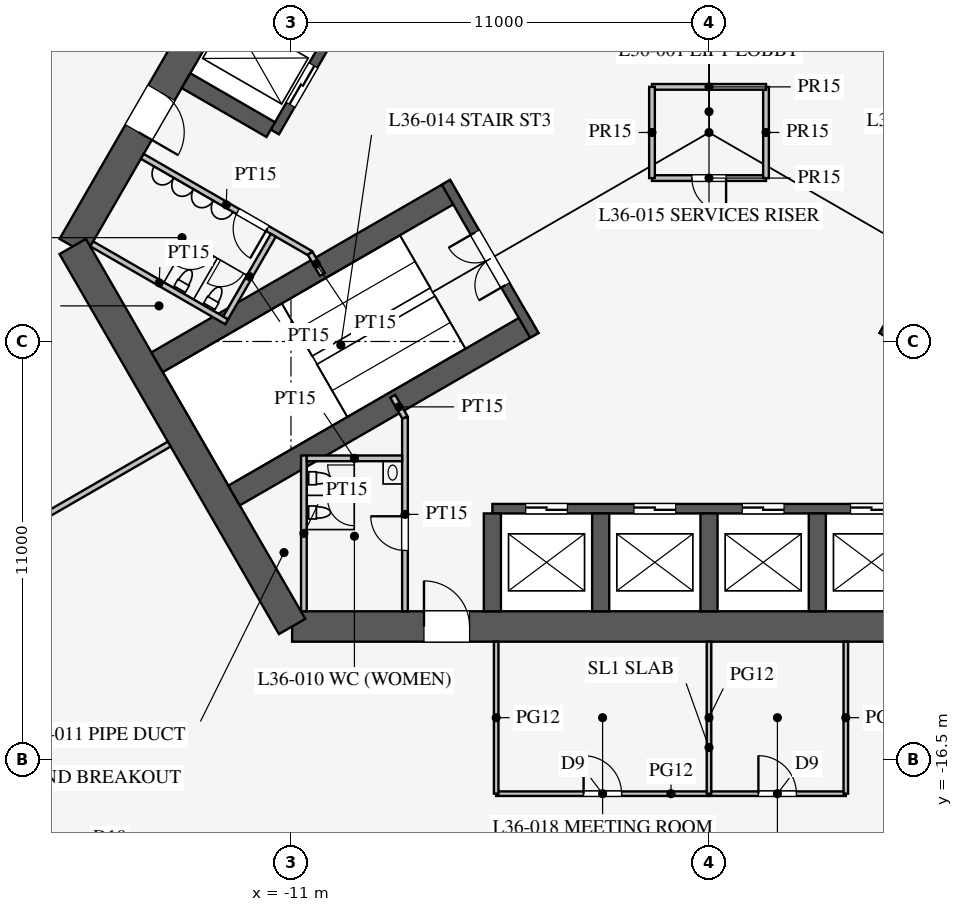
"""IFC4 building model, lengths in metres.
Left out: names, types, materials, properties, quantities, classifications, styles, units other than length and angle.
Written with IfcOpenShell. Run it as: python <this file> out.ifc"""

import sys

from ifc_helpers import new_model, si_unit, direction, frame, frame_2d, origin, place, context, subcontext, project, spatial, rectangle, extrude, element, fill, save


model = new_model("IFC4")
c1 = context("Model", 3, precision=1e-05, world=origin(), true_north=direction((0.0, 1.0)))
c2 = subcontext(c1, "Body", "Model", "MODEL_VIEW")
j1 = project(units=[si_unit("LENGTHUNIT", "METRE"), si_unit("PLANEANGLEUNIT", "RADIAN")], contexts=[c1])
p1 = place(None, origin())
s1 = spatial("IfcSite", under=j1, at=p1, CompositionType="ELEMENT")
p2 = place(p1, origin())
s2 = spatial("IfcBuilding", under=s1, at=p2, CompositionType="ELEMENT")
p3 = place(p2, frame((0.0, 0.0, 157.7)))
s3 = spatial("IfcBuildingStorey", under=s2, at=p3, CompositionType="ELEMENT", Elevation=157.7)
p4 = place(p3, frame((-10.97, -13.0, 0.0), z_axis=(0.0, 0.0, 1.0), x_axis=(1.0, 0.0, 0.0)))
e1 = element("IfcWall", 1, at=p4, inside=s3, PredefinedType="SHEAR", context=c2, shape_type="SweptSolid", body=[
    extrude(rectangle(XDim=21.939, YDim=0.8, at=frame_2d((10.97, 0.0))), origin(), (0.0, 0.0, 1.0), 4.2),
])
p5 = place(p4, frame((17.27, 0.0, 0.0)))
e2 = element("IfcOpeningElement", 2, at=p5, cuts=e1, PredefinedType="OPENING", context=c2, shape_type="SweptSolid", body=[
    extrude(rectangle(XDim=1.2, YDim=2.1, at=frame_2d((0.6, 1.05))), frame((0.0, 0.41, 0.0), z_axis=(0.0, -1.0, 0.0), x_axis=(1.0, 0.0, 0.0)), (0.0, 0.0, 1.0), 0.82),
])
p6 = place(p4, frame((3.47, 0.0, 0.0)))
e3 = element("IfcOpeningElement", 3, at=p6, cuts=e1, PredefinedType="OPENING", context=c2, shape_type="SweptSolid", body=[
    extrude(rectangle(XDim=1.2, YDim=2.1, at=frame_2d((0.6, 1.05))), frame((0.0, 0.41, 0.0), z_axis=(0.0, -1.0, 0.0), x_axis=(1.0, 0.0, 0.0)), (0.0, 0.0, 1.0), 0.82),
])
p7 = place(p3, frame((-5.773, 16.0, 0.0), z_axis=(0.0, 0.0, 1.0), x_axis=(-0.500002442456, -0.866023993627, 0.0)))
e4 = element("IfcWall", 4, at=p7, inside=s3, PredefinedType="SHEAR", context=c2, shape_type="SweptSolid", body=[
    extrude(rectangle(XDim=21.939, YDim=0.8, at=frame_2d((10.97, 0.0))), origin(), (0.0, 0.0, 1.0), 4.2),
])
p8 = place(p7, frame((17.27, 0.0, 0.0)))
e5 = element("IfcOpeningElement", 5, at=p8, cuts=e4, PredefinedType="OPENING", context=c2, shape_type="SweptSolid", body=[
    extrude(rectangle(XDim=1.2, YDim=2.1, at=frame_2d((0.6, 1.05))), frame((0.0, 0.41, 0.0), z_axis=(0.0, -1.0, 0.0), x_axis=(1.0, 0.0, 0.0)), (0.0, 0.0, 1.0), 0.82),
])
p9 = place(p7, frame((3.47, 0.0, 0.0)))
e6 = element("IfcOpeningElement", 6, at=p9, cuts=e4, PredefinedType="OPENING", context=c2, shape_type="SweptSolid", body=[
    extrude(rectangle(XDim=1.2, YDim=2.1, at=frame_2d((0.6, 1.05))), frame((0.0, 0.41, 0.0), z_axis=(0.0, -1.0, 0.0), x_axis=(1.0, 0.0, 0.0)), (0.0, 0.0, 1.0), 0.82),
])
p10 = place(p3, frame((-16.743, -3.0, 0.0), z_axis=(0.0, 0.0, 1.0), x_axis=(0.499995765644, -0.866027848477, 0.0)))
e7 = element("IfcWall", 7, at=p10, inside=s3, PredefinedType="SHEAR", context=c2, shape_type="SweptSolid", body=[
    extrude(rectangle(XDim=11.547, YDim=0.8, at=frame_2d((5.773, 0.0))), origin(), (0.0, 0.0, 1.0), 4.2),
])
p11 = place(p3, frame((-5.7, -9.9, 0.0), z_axis=(0.0, 0.0, 1.0), x_axis=(1.0, 0.0, 0.0)))
e8 = element("IfcWall", 8, at=p11, inside=s3, PredefinedType="SHEAR", context=c2, shape_type="SweptSolid", body=[
    extrude(rectangle(XDim=11.4, YDim=0.25, at=frame_2d((5.7, 0.0))), origin(), (0.0, 0.0, 1.0), 4.2),
])
p12 = place(p11, frame((0.875, 0.0, 0.0)))
e9 = element("IfcOpeningElement", 9, at=p12, cuts=e8, PredefinedType="OPENING", context=c2, shape_type="SweptSolid", body=[
    extrude(rectangle(XDim=1.1, YDim=2.2, at=frame_2d((0.55, 1.1))), frame((0.0, 0.135, 0.0), z_axis=(0.0, -1.0, 0.0), x_axis=(1.0, 0.0, 0.0)), (0.0, 0.0, 1.0), 0.27),
])
p13 = place(p11, frame((3.725, 0.0, 0.0)))
e10 = element("IfcOpeningElement", 10, at=p13, cuts=e8, PredefinedType="OPENING", context=c2, shape_type="SweptSolid", body=[
    extrude(rectangle(XDim=1.1, YDim=2.2, at=frame_2d((0.55, 1.1))), frame((0.0, 0.135, 0.0), z_axis=(0.0, -1.0, 0.0), x_axis=(1.0, 0.0, 0.0)), (0.0, 0.0, 1.0), 0.27),
])
p14 = place(p11, frame((6.575, 0.0, 0.0)))
e11 = element("IfcOpeningElement", 11, at=p14, cuts=e8, PredefinedType="OPENING", context=c2, shape_type="SweptSolid", body=[
    extrude(rectangle(XDim=1.1, YDim=2.2, at=frame_2d((0.55, 1.1))), frame((0.0, 0.135, 0.0), z_axis=(0.0, -1.0, 0.0), x_axis=(1.0, 0.0, 0.0)), (0.0, 0.0, 1.0), 0.27),
])
p15 = place(p11, frame((9.425, 0.0, 0.0)))
e12 = element("IfcOpeningElement", 12, at=p15, cuts=e8, PredefinedType="OPENING", context=c2, shape_type="SweptSolid", body=[
    extrude(rectangle(XDim=1.1, YDim=2.2, at=frame_2d((0.55, 1.1))), frame((0.0, 0.135, 0.0), z_axis=(0.0, -1.0, 0.0), x_axis=(1.0, 0.0, 0.0)), (0.0, 0.0, 1.0), 0.27),
])
for number, where, z_axis, x_axis in (
    (13, (-5.7, -10.025, 0.0), (0.0, 0.0, 1.0), (0.0, -1.0, 0.0)),
    (14, (-2.85, -10.025, 0.0), (0.0, 0.0, 1.0), (0.0, -1.0, 0.0)),
    (15, (0.0, -10.025, 0.0), (0.0, 0.0, 1.0), (0.0, -1.0, 0.0)),
    (16, (2.85, -10.025, 0.0), (0.0, 0.0, 1.0), (0.0, -1.0, 0.0)),
):
    element("IfcWall", number, at=place(p3, frame(where, z_axis=z_axis, x_axis=x_axis)), inside=s3, PredefinedType="SHEAR", context=c2, shape_type="SweptSolid", body=[
        extrude(rectangle(XDim=2.575, YDim=0.45, at=frame_2d((1.288, 0.0))), origin(), (0.0, 0.0, 1.0), 4.2),
    ])
p16 = place(p3, frame((-5.724, 9.886, 0.0), z_axis=(0.0, 0.0, 1.0), x_axis=(-0.500001763848, -0.866024385424, 0.0)))
e17 = element("IfcWall", 17, at=p16, inside=s3, PredefinedType="SHEAR", context=c2, shape_type="SweptSolid", body=[
    extrude(rectangle(XDim=11.4, YDim=0.25, at=frame_2d((5.7, 0.0))), origin(), (0.0, 0.0, 1.0), 4.2),
])
p17 = place(p16, frame((6.525, 0.0, 0.0)))
e18 = element("IfcOpeningElement", 18, at=p17, cuts=e17, PredefinedType="OPENING", context=c2, shape_type="SweptSolid", body=[
    extrude(rectangle(XDim=1.2, YDim=2.2, at=frame_2d((0.6, 1.1))), frame((0.0, 0.135, 0.0), z_axis=(0.0, -1.0, 0.0), x_axis=(1.0, 0.0, 0.0)), (0.0, 0.0, 1.0), 0.27),
])
p18 = place(p16, frame((9.375, 0.0, 0.0)))
e19 = element("IfcOpeningElement", 19, at=p18, cuts=e17, PredefinedType="OPENING", context=c2, shape_type="SweptSolid", body=[
    extrude(rectangle(XDim=1.2, YDim=2.2, at=frame_2d((0.6, 1.1))), frame((0.0, 0.135, 0.0), z_axis=(0.0, -1.0, 0.0), x_axis=(1.0, 0.0, 0.0)), (0.0, 0.0, 1.0), 0.27),
])
p19 = place(p3, frame((-11.532, 0.076, 0.0), z_axis=(0.0, 0.0, 1.0), x_axis=(-0.866005588531, 0.500034319456, 0.0)))
e20 = element("IfcWall", 20, at=p19, inside=s3, PredefinedType="SHEAR", context=c2, shape_type="SweptSolid", body=[
    extrude(rectangle(XDim=2.575, YDim=0.45, at=frame_2d((1.288, 0.0))), origin(), (0.0, 0.0, 1.0), 4.2),
])
p20 = place(p3, frame((4.638, -5.016, 0.0), z_axis=(0.0, 0.0, 1.0), x_axis=(0.866019375473, -0.500010441196, 0.0)))
e21 = element("IfcWall", 21, at=p20, inside=s3, PredefinedType="SHEAR", context=c2, shape_type="SweptSolid", body=[
    extrude(rectangle(XDim=9.075, YDim=0.6, at=frame_2d((4.538, 0.0))), origin(), (0.0, 0.0, 1.0), 4.2),
])
p21 = place(p3, frame((4.597, -5.339, 0.0), z_axis=(0.0, 0.0, 1.0), x_axis=(0.499984536904, 0.866034331223, 0.0)))
e22 = element("IfcWall", 22, at=p21, inside=s3, PredefinedType="SHEAR", context=c2, shape_type="SweptSolid", body=[
    extrude(rectangle(XDim=4.65, YDim=0.25, at=frame_2d((2.325, 0.0))), origin(), (0.0, 0.0, 1.0), 4.2),
])
p22 = place(p21, frame((1.525, 0.0, 0.0)))
e23 = element("IfcOpeningElement", 23, at=p22, cuts=e22, PredefinedType="OPENING", context=c2, shape_type="SweptSolid", body=[
    extrude(rectangle(XDim=1.6, YDim=2.1, at=frame_2d((0.8, 1.05))), frame((0.0, 0.135, 0.0), z_axis=(0.0, -1.0, 0.0), x_axis=(1.0, 0.0, 0.0)), (0.0, 0.0, 1.0), 0.27),
])
for number, where, z_axis, x_axis in (
    (24, (-6.663, -1.509, 0.0), (0.0, 0.0, 1.0), (-0.866, -0.5, 0.0)),
    (25, (-4.638, -5.016, 0.0), (0.0, 0.0, 1.0), (-0.866, -0.5, 0.0)),
):
    element("IfcWall", number, at=place(p3, frame(where, z_axis=z_axis, x_axis=x_axis)), inside=s3, PredefinedType="SHEAR", context=c2, shape_type="SweptSolid", body=[
        extrude(rectangle(XDim=9.075, YDim=0.6, at=frame_2d((4.538, 0.0))), origin(), (0.0, 0.0, 1.0), 4.2),
    ])
p23 = place(p3, frame((-6.922, -1.312, 0.0), z_axis=(0.0, 0.0, 1.0), x_axis=(0.499984536904, -0.866034331223, 0.0)))
e26 = element("IfcWall", 26, at=p23, inside=s3, PredefinedType="SHEAR", context=c2, shape_type="SweptSolid", body=[
    extrude(rectangle(XDim=4.65, YDim=0.25, at=frame_2d((2.325, 0.0))), origin(), (0.0, 0.0, 1.0), 4.2),
])
p24 = place(p23, frame((1.525, 0.0, 0.0)))
e27 = element("IfcOpeningElement", 27, at=p24, cuts=e26, PredefinedType="OPENING", context=c2, shape_type="SweptSolid", body=[
    extrude(rectangle(XDim=1.6, YDim=2.1, at=frame_2d((0.8, 1.05))), frame((0.0, 0.135, 0.0), z_axis=(0.0, -1.0, 0.0), x_axis=(1.0, 0.0, 0.0)), (0.0, 0.0, 1.0), 0.27),
])
p25 = place(p3, frame((-8.0, -7.5, 0.0), z_axis=(0.0, 0.0, 1.0), x_axis=(0.0, -1.0, 0.0)))
e28 = element("IfcWall", 28, at=p25, inside=s3, PredefinedType="PARTITIONING", context=c2, shape_type="SweptSolid", body=[
    extrude(rectangle(XDim=5.1, YDim=0.15, at=frame_2d((2.55, 0.0))), origin(), (0.0, 0.0, 1.0), 4.0),
])
p26 = place(p25, frame((2.6, 0.0, 0.0)))
e29 = element("IfcOpeningElement", 29, at=p26, cuts=e28, PredefinedType="OPENING", context=c2, shape_type="SweptSolid", body=[
    extrude(rectangle(XDim=0.9, YDim=2.1, at=frame_2d((0.45, 1.05))), frame((0.0, 0.085, 0.0), z_axis=(0.0, -1.0, 0.0), x_axis=(1.0, 0.0, 0.0)), (0.0, 0.0, 1.0), 0.17),
])
p27 = place(p3, frame((-10.495, -3.178, 0.0), z_axis=(0.0, 0.0, 1.0), x_axis=(-0.86602216432, 0.500005610874, 0.0)))
e30 = element("IfcWall", 30, at=p27, inside=s3, PredefinedType="PARTITIONING", context=c2, shape_type="SweptSolid", body=[
    extrude(rectangle(XDim=5.1, YDim=0.15, at=frame_2d((2.55, 0.0))), origin(), (0.0, 0.0, 1.0), 4.0),
])
p28 = place(p27, frame((1.3, 0.0, 0.0)))
e31 = element("IfcOpeningElement", 31, at=p28, cuts=e30, PredefinedType="OPENING", context=c2, shape_type="SweptSolid", body=[
    extrude(rectangle(XDim=0.9, YDim=2.1, at=frame_2d((0.45, 1.05))), frame((0.0, 0.085, 0.0), z_axis=(0.0, -1.0, 0.0), x_axis=(1.0, 0.0, 0.0)), (0.0, 0.0, 1.0), 0.17),
])
for number, where, z_axis, x_axis in (
    (32, (-10.495, -3.178, 0.0), (0.0, 0.0, 1.0), (0.5, -0.866, 0.0)),
    (33, (-8.0, -7.5, 0.0), (0.0, 0.0, 1.0), (-0.5, 0.866, 0.0)),
):
    element("IfcWall", number, at=place(p3, frame(where, z_axis=z_axis, x_axis=x_axis)), inside=s3, PredefinedType="PARTITIONING", context=c2, shape_type="SweptSolid", body=[
        extrude(rectangle(XDim=0.645, YDim=0.15, at=frame_2d((0.323, 0.0))), origin(), (0.0, 0.0, 1.0), 4.0),
    ])
p29 = place(p3, frame((-12.691, -4.982, 0.0), z_axis=(0.0, 0.0, 1.0), x_axis=(-0.8660249478, 0.500000789788, 0.0)))
e34 = element("IfcWall", 34, at=p29, inside=s3, PredefinedType="PARTITIONING", context=c2, shape_type="SweptSolid", body=[
    extrude(rectangle(XDim=4.1, YDim=0.15, at=frame_2d((2.05, 0.0))), origin(), (0.0, 0.0, 1.0), 4.0),
])
p30 = place(p3, frame((-11.464, -2.706, 0.0), z_axis=(0.0, 0.0, 1.0), x_axis=(-0.50001992892, -0.866013897511, 0.0)))
e35 = element("IfcWall", 35, at=p30, inside=s3, PredefinedType="PARTITIONING", context=c2, shape_type="SweptSolid", body=[
    extrude(rectangle(XDim=2.51, YDim=0.15, at=frame_2d((1.255, 0.0))), origin(), (0.0, 0.0, 1.0), 4.0),
])
p31 = place(p3, frame((-10.66, -8.5, 0.0), z_axis=(0.0, 0.0, 1.0), x_axis=(0.0, -1.0, 0.0)))
e36 = element("IfcWall", 36, at=p31, inside=s3, PredefinedType="PARTITIONING", context=c2, shape_type="SweptSolid", body=[
    extrude(rectangle(XDim=4.1, YDim=0.15, at=frame_2d((2.05, 0.0))), origin(), (0.0, 0.0, 1.0), 4.0),
])
p32 = place(p3, frame((-8.075, -8.575, 0.0), z_axis=(0.0, 0.0, 1.0), x_axis=(-1.0, 0.0, 0.0)))
e37 = element("IfcWall", 37, at=p32, inside=s3, PredefinedType="PARTITIONING", context=c2, shape_type="SweptSolid", body=[
    extrude(rectangle(XDim=2.51, YDim=0.15, at=frame_2d((1.255, 0.0))), origin(), (0.0, 0.0, 1.0), 4.0),
])
p33 = place(p3, frame((-1.5, -1.2, 0.0), z_axis=(0.0, 0.0, 1.0), x_axis=(1.0, 0.0, 0.0)))
e38 = element("IfcWall", 38, at=p33, inside=s3, PredefinedType="PARTITIONING", context=c2, shape_type="SweptSolid", body=[
    extrude(rectangle(XDim=3.0, YDim=0.15, at=frame_2d((1.5, 0.0))), origin(), (0.0, 0.0, 1.0), 4.0),
])
p34 = place(p33, frame((1.05, 0.0, 0.0)))
e39 = element("IfcOpeningElement", 39, at=p34, cuts=e38, PredefinedType="OPENING", context=c2, shape_type="SweptSolid", body=[
    extrude(rectangle(XDim=0.9, YDim=2.1, at=frame_2d((0.45, 1.05))), frame((0.0, 0.085, 0.0), z_axis=(0.0, -1.0, 0.0), x_axis=(1.0, 0.0, 0.0)), (0.0, 0.0, 1.0), 0.17),
])
p35 = place(p3, frame((1.5, -1.2, 0.0), z_axis=(0.0, 0.0, 1.0), x_axis=(0.0, 1.0, 0.0)))
e40 = element("IfcWall", 40, at=p35, inside=s3, PredefinedType="PARTITIONING", context=c2, shape_type="SweptSolid", body=[
    extrude(rectangle(XDim=2.4, YDim=0.15, at=frame_2d((1.2, 0.0))), origin(), (0.0, 0.0, 1.0), 4.0),
])
p36 = place(p3, frame((1.5, 1.2, 0.0), z_axis=(0.0, 0.0, 1.0), x_axis=(-1.0, 0.0, 0.0)))
e41 = element("IfcWall", 41, at=p36, inside=s3, PredefinedType="PARTITIONING", context=c2, shape_type="SweptSolid", body=[
    extrude(rectangle(XDim=3.0, YDim=0.15, at=frame_2d((1.5, 0.0))), origin(), (0.0, 0.0, 1.0), 4.0),
])
p37 = place(p3, frame((-1.5, 1.2, 0.0), z_axis=(0.0, 0.0, 1.0), x_axis=(0.0, -1.0, 0.0)))
e42 = element("IfcWall", 42, at=p37, inside=s3, PredefinedType="PARTITIONING", context=c2, shape_type="SweptSolid", body=[
    extrude(rectangle(XDim=2.4, YDim=0.15, at=frame_2d((1.2, 0.0))), origin(), (0.0, 0.0, 1.0), 4.0),
])
p38 = place(p3, frame((-14.203, -8.2, 0.0), z_axis=(0.0, 0.0, 1.0), x_axis=(-0.866024668836, -0.500001272966, 0.0)))
e43 = element("IfcWall", 43, at=p38, inside=s3, PredefinedType="PARTITIONING", context=c2, shape_type="SweptSolid", body=[
    extrude(rectangle(XDim=16.65, YDim=0.15, at=frame_2d((8.325, 0.0))), origin(), (0.0, 0.0, 1.0), 2.3),
])
p39 = place(p3, frame((0.0, -17.4, 0.0), z_axis=(0.0, 0.0, 1.0), x_axis=(1.0, 0.0, 0.0)))
e44 = element("IfcWall", 44, at=p39, inside=s3, PredefinedType="PARTITIONING", context=c2, shape_type="SweptSolid", body=[
    extrude(rectangle(XDim=3.6, YDim=0.12, at=frame_2d((1.8, 0.0))), origin(), (0.0, 0.0, 1.0), 2.9),
])
p40 = place(p39, frame((1.3, 0.0, 0.15)))
e45 = element("IfcOpeningElement", 45, at=p40, cuts=e44, PredefinedType="OPENING", context=c2, shape_type="SweptSolid", body=[
    extrude(rectangle(XDim=1.0, YDim=2.1, at=frame_2d((0.5, 1.05))), frame((0.0, 0.07, 0.0), z_axis=(0.0, -1.0, 0.0), x_axis=(1.0, 0.0, 0.0)), (0.0, 0.0, 1.0), 0.14),
])
p41 = place(p3, frame((-5.6, -17.4, 0.0), z_axis=(0.0, 0.0, 1.0), x_axis=(1.0, 0.0, 0.0)))
e46 = element("IfcWall", 46, at=p41, inside=s3, PredefinedType="PARTITIONING", context=c2, shape_type="SweptSolid", body=[
    extrude(rectangle(XDim=5.6, YDim=0.12, at=frame_2d((2.8, 0.0))), origin(), (0.0, 0.0, 1.0), 2.9),
])
p42 = place(p41, frame((2.3, 0.0, 0.15)))
e47 = element("IfcOpeningElement", 47, at=p42, cuts=e46, PredefinedType="OPENING", context=c2, shape_type="SweptSolid", body=[
    extrude(rectangle(XDim=1.0, YDim=2.1, at=frame_2d((0.5, 1.05))), frame((0.0, 0.07, 0.0), z_axis=(0.0, -1.0, 0.0), x_axis=(1.0, 0.0, 0.0)), (0.0, 0.0, 1.0), 0.14),
])
p43 = place(p3, frame((3.6, -13.4, 0.0), z_axis=(0.0, 0.0, 1.0), x_axis=(0.0, -1.0, 0.0)))
e48 = element("IfcWall", 48, at=p43, inside=s3, PredefinedType="PARTITIONING", context=c2, shape_type="SweptSolid", body=[
    extrude(rectangle(XDim=4.0, YDim=0.12, at=frame_2d((2.0, 0.0))), origin(), (0.0, 0.0, 1.0), 2.9),
])
p44 = place(p3, frame((0.0, -13.4, 0.0), z_axis=(0.0, 0.0, 1.0), x_axis=(0.0, -1.0, 0.0)))
e49 = element("IfcWall", 49, at=p44, inside=s3, PredefinedType="PARTITIONING", context=c2, shape_type="SweptSolid", body=[
    extrude(rectangle(XDim=4.0, YDim=0.12, at=frame_2d((2.0, 0.0))), origin(), (0.0, 0.0, 1.0), 2.8),
])
p45 = place(p3, frame((-5.6, -13.4, 0.0), z_axis=(0.0, 0.0, 1.0), x_axis=(0.0, -1.0, 0.0)))
e50 = element("IfcWall", 50, at=p45, inside=s3, PredefinedType="PARTITIONING", context=c2, shape_type="SweptSolid", body=[
    extrude(rectangle(XDim=4.0, YDim=0.12, at=frame_2d((2.0, 0.0))), origin(), (0.0, 0.0, 1.0), 2.9),
])
p46 = place(p26, frame((0.9, 0.0, 0.0), z_axis=(0.0, 0.0, 1.0), x_axis=(-1.0, 0.0, 0.0)))
e51 = element("IfcDoor", 51, at=p46, inside=s3, OperationType="SINGLE_SWING_RIGHT", PredefinedType="DOOR", context=c2, shape_type="SweptSolid", body=[
    extrude(rectangle(XDim=0.9, YDim=2.1, at=frame_2d((0.45, 1.05))), frame((0.0, 0.025, 0.0), z_axis=(0.0, -1.0, 0.0), x_axis=(1.0, 0.0, 0.0)), (0.0, 0.0, 1.0), 0.05),
])
fill(e29, e51)
p47 = place(p28, origin())
e52 = element("IfcDoor", 52, at=p47, inside=s3, OperationType="SINGLE_SWING_LEFT", PredefinedType="DOOR", context=c2, shape_type="SweptSolid", body=[
    extrude(rectangle(XDim=0.9, YDim=2.1, at=frame_2d((0.45, 1.05))), frame((0.0, 0.025, 0.0), z_axis=(0.0, -1.0, 0.0), x_axis=(1.0, 0.0, 0.0)), (0.0, 0.0, 1.0), 0.05),
])
fill(e31, e52)
p48 = place(p34, frame((0.9, 0.0, 0.0), z_axis=(0.0, 0.0, 1.0), x_axis=(-1.0, 0.0, 0.0)))
e53 = element("IfcDoor", 53, at=p48, inside=s3, OperationType="SINGLE_SWING_LEFT", PredefinedType="DOOR", context=c2, shape_type="SweptSolid", body=[
    extrude(rectangle(XDim=0.9, YDim=2.1, at=frame_2d((0.45, 1.05))), frame((0.0, 0.025, 0.0), z_axis=(0.0, -1.0, 0.0), x_axis=(1.0, 0.0, 0.0)), (0.0, 0.0, 1.0), 0.05),
])
fill(e39, e53)
p49 = place(p24, frame((1.6, 0.0, 0.0), z_axis=(0.0, 0.0, 1.0), x_axis=(-1.0, 0.0, 0.0)))
e54 = element("IfcDoor", 54, at=p49, inside=s3, OperationType="DOUBLE_DOOR_SINGLE_SWING", PredefinedType="DOOR", context=c2, shape_type="SweptSolid", body=[
    extrude(rectangle(XDim=1.6, YDim=2.1, at=frame_2d((0.8, 1.05))), frame((0.0, 0.025, 0.0), z_axis=(0.0, -1.0, 0.0), x_axis=(1.0, 0.0, 0.0)), (0.0, 0.0, 1.0), 0.05),
])
fill(e27, e54)
p50 = place(p6, origin())
e55 = element("IfcDoor", 55, at=p50, inside=s3, OperationType="SINGLE_SWING_LEFT", PredefinedType="DOOR", context=c2, shape_type="SweptSolid", body=[
    extrude(rectangle(XDim=1.2, YDim=2.1, at=frame_2d((0.6, 1.05))), frame((0.0, 0.025, 0.0), z_axis=(0.0, -1.0, 0.0), x_axis=(1.0, 0.0, 0.0)), (0.0, 0.0, 1.0), 0.05),
])
fill(e3, e55)
p51 = place(p8, origin())
e56 = element("IfcDoor", 56, at=p51, inside=s3, OperationType="SINGLE_SWING_RIGHT", PredefinedType="DOOR", context=c2, shape_type="SweptSolid", body=[
    extrude(rectangle(XDim=1.2, YDim=2.1, at=frame_2d((0.6, 1.05))), frame((0.0, 0.025, 0.0), z_axis=(0.0, -1.0, 0.0), x_axis=(1.0, 0.0, 0.0)), (0.0, 0.0, 1.0), 0.05),
])
fill(e5, e56)
p52 = place(p42, origin())
e57 = element("IfcDoor", 57, at=p52, inside=s3, OperationType="SINGLE_SWING_LEFT", PredefinedType="DOOR", context=c2, shape_type="SweptSolid", body=[
    extrude(rectangle(XDim=1.0, YDim=2.1, at=frame_2d((0.5, 1.05))), frame((0.0, 0.025, 0.0), z_axis=(0.0, -1.0, 0.0), x_axis=(1.0, 0.0, 0.0)), (0.0, 0.0, 1.0), 0.05),
])
fill(e47, e57)
p53 = place(p40, origin())
e58 = element("IfcDoor", 58, at=p53, inside=s3, OperationType="SINGLE_SWING_LEFT", PredefinedType="DOOR", context=c2, shape_type="SweptSolid", body=[
    extrude(rectangle(XDim=1.0, YDim=2.1, at=frame_2d((0.5, 1.05))), frame((0.0, 0.025, 0.0), z_axis=(0.0, -1.0, 0.0), x_axis=(1.0, 0.0, 0.0)), (0.0, 0.0, 1.0), 0.05),
])
fill(e45, e58)
p54 = place(p12, origin())
e59 = element("IfcDoor", 59, at=p54, inside=s3, OperationType="DOUBLE_DOOR_SLIDING", PredefinedType="DOOR", context=c2, shape_type="SweptSolid", body=[
    extrude(rectangle(XDim=1.1, YDim=2.2, at=frame_2d((0.55, 1.1))), frame((0.0, 0.025, 0.0), z_axis=(0.0, -1.0, 0.0), x_axis=(1.0, 0.0, 0.0)), (0.0, 0.0, 1.0), 0.05),
])
fill(e9, e59)
p55 = place(p13, origin())
e60 = element("IfcDoor", 60, at=p55, inside=s3, OperationType="DOUBLE_DOOR_SLIDING", PredefinedType="DOOR", context=c2, shape_type="SweptSolid", body=[
    extrude(rectangle(XDim=1.1, YDim=2.2, at=frame_2d((0.55, 1.1))), frame((0.0, 0.025, 0.0), z_axis=(0.0, -1.0, 0.0), x_axis=(1.0, 0.0, 0.0)), (0.0, 0.0, 1.0), 0.05),
])
fill(e10, e60)
p56 = place(p14, origin())
e61 = element("IfcDoor", 61, at=p56, inside=s3, OperationType="DOUBLE_DOOR_SLIDING", PredefinedType="DOOR", context=c2, shape_type="SweptSolid", body=[
    extrude(rectangle(XDim=1.1, YDim=2.2, at=frame_2d((0.55, 1.1))), frame((0.0, 0.025, 0.0), z_axis=(0.0, -1.0, 0.0), x_axis=(1.0, 0.0, 0.0)), (0.0, 0.0, 1.0), 0.05),
])
fill(e11, e61)
p57 = place(p15, origin())
e62 = element("IfcDoor", 62, at=p57, inside=s3, OperationType="DOUBLE_DOOR_SLIDING", PredefinedType="DOOR", context=c2, shape_type="SweptSolid", body=[
    extrude(rectangle(XDim=1.1, YDim=2.2, at=frame_2d((0.55, 1.1))), frame((0.0, 0.025, 0.0), z_axis=(0.0, -1.0, 0.0), x_axis=(1.0, 0.0, 0.0)), (0.0, 0.0, 1.0), 0.05),
])
fill(e12, e62)
p58 = place(p18, origin())
e63 = element("IfcDoor", 63, at=p58, inside=s3, OperationType="DOUBLE_DOOR_SLIDING", PredefinedType="DOOR", context=c2, shape_type="SweptSolid", body=[
    extrude(rectangle(XDim=1.2, YDim=2.2, at=frame_2d((0.6, 1.1))), frame((0.0, 0.025, 0.0), z_axis=(0.0, -1.0, 0.0), x_axis=(1.0, 0.0, 0.0)), (0.0, 0.0, 1.0), 0.05),
])
fill(e19, e63)
save(model, sys.argv[1])
